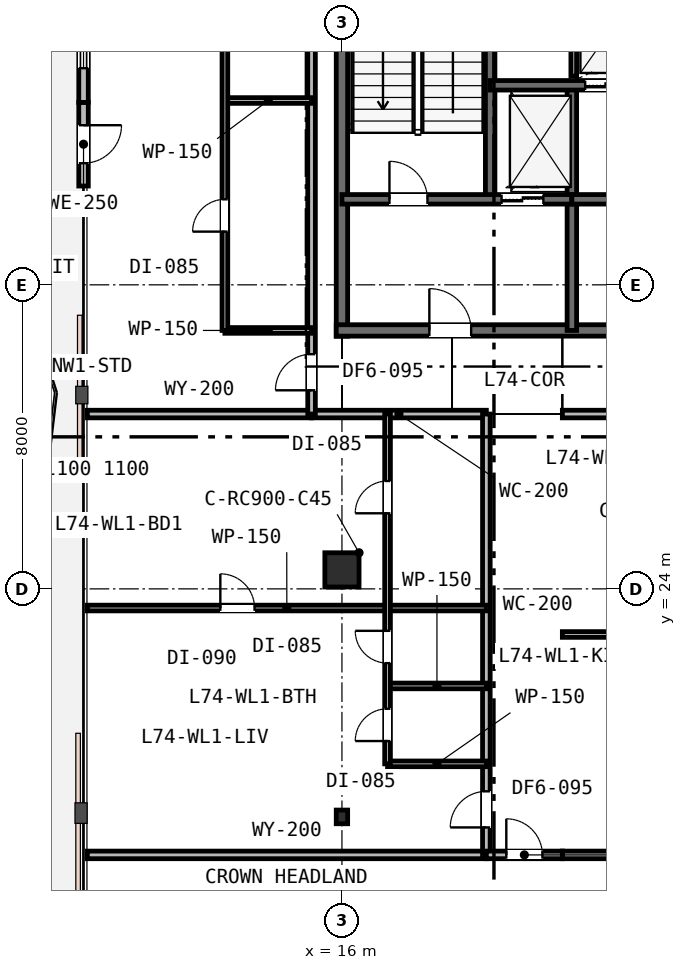
"""IFC4 building model, lengths in metres.
Left out: names, types, materials, properties, quantities, classifications, styles, units other than length and angle.
Written with IfcOpenShell. Run it as: python <this file> out.ifc"""

import sys

from ifc_helpers import new_model, si_unit, direction, frame, frame_2d, origin, origin_2d, place, context, subcontext, project, spatial, rectangle, i_section, extrude, element, fill, save


model = new_model("IFC4")
c1 = context("Model", 3, precision=1e-05, world=origin(), true_north=direction((0.0, 1.0)))
c2 = subcontext(c1, "Body", "Model", "MODEL_VIEW")
j1 = project(units=[si_unit("LENGTHUNIT", "METRE"), si_unit("PLANEANGLEUNIT", "RADIAN")], contexts=[c1])
p1 = place(None, origin())
s1 = spatial("IfcSite", under=j1, at=p1, CompositionType="ELEMENT")
p2 = place(p1, origin())
s2 = spatial("IfcBuilding", under=s1, at=p2, CompositionType="ELEMENT")
p3 = place(p2, frame((0.0, 0.0, 286.8)))
s3 = spatial("IfcBuildingStorey", under=s2, at=p3, CompositionType="ELEMENT", Elevation=286.8)
p4 = place(p3, frame((16.0, 30.65, 0.0), z_axis=(0.0, 0.0, 1.0), x_axis=(0.0, 1.0, 0.0)))
e1 = element("IfcWall", 1, at=p4, inside=s3, PredefinedType="SHEAR", context=c2, shape_type="SweptSolid", body=[
    extrude(rectangle(XDim=12.3, YDim=0.3, at=frame_2d((6.15, 0.0))), origin(), (0.0, 0.0, 1.0), 3.8),
])
p5 = place(p3, frame((15.85, 30.8, 0.0), z_axis=(0.0, 0.0, 1.0), x_axis=(1.0, 0.0, 0.0)))
e2 = element("IfcWall", 2, at=p5, inside=s3, PredefinedType="SHEAR", context=c2, shape_type="SweptSolid", body=[
    extrude(rectangle(XDim=11.2, YDim=0.3, at=frame_2d((5.6, 0.0))), origin(), (0.0, 0.0, 1.0), 3.8),
])
p6 = place(p5, frame((2.45, 0.0, 0.0)))
e3 = element("IfcOpeningElement", 3, at=p6, cuts=e2, PredefinedType="OPENING", context=c2, shape_type="SweptSolid", body=[
    extrude(rectangle(XDim=1.1, YDim=2.15, at=frame_2d((0.55, 1.075))), frame((0.0, 0.16, 0.0), z_axis=(0.0, -1.0, 0.0), x_axis=(1.0, 0.0, 0.0)), (0.0, 0.0, 1.0), 0.32),
])
p7 = place(p3, frame((19.9, 34.25, 0.0), z_axis=(0.0, 0.0, 1.0), x_axis=(0.0, 1.0, 0.0)))
e4 = element("IfcWall", 4, at=p7, inside=s3, PredefinedType="SHEAR", context=c2, shape_type="SweptSolid", body=[
    extrude(rectangle(XDim=8.65, YDim=0.25, at=frame_2d((4.325, 0.0))), origin(), (0.0, 0.0, 1.0), 3.8),
])
p8 = place(p3, frame((22.05, 30.8, 0.0), z_axis=(0.0, 0.0, 1.0), x_axis=(0.0, 1.0, 0.0)))
e5 = element("IfcWall", 5, at=p8, inside=s3, PredefinedType="SHEAR", context=c2, shape_type="SweptSolid", body=[
    extrude(rectangle(XDim=6.45, YDim=0.25, at=frame_2d((3.225, 0.0))), origin(), (0.0, 0.0, 1.0), 3.8),
])
p9 = place(p3, frame((16.0, 34.25, 0.0), z_axis=(0.0, 0.0, 1.0), x_axis=(1.0, 0.0, 0.0)))
e6 = element("IfcWall", 6, at=p9, inside=s3, PredefinedType="SHEAR", context=c2, shape_type="SweptSolid", body=[
    extrude(rectangle(XDim=6.05, YDim=0.25, at=frame_2d((3.025, 0.0))), origin(), (0.0, 0.0, 1.0), 3.8),
])
p10 = place(p9, frame((1.25, 0.0, 0.0)))
e7 = element("IfcOpeningElement", 7, at=p10, cuts=e6, PredefinedType="OPENING", context=c2, shape_type="SweptSolid", body=[
    extrude(rectangle(XDim=1.0, YDim=2.15, at=frame_2d((0.5, 1.075))), frame((0.0, 0.135, 0.0), z_axis=(0.0, -1.0, 0.0), x_axis=(1.0, 0.0, 0.0)), (0.0, 0.0, 1.0), 0.27),
])
p11 = place(p9, frame((4.2, 0.0, 0.0)))
e8 = element("IfcOpeningElement", 8, at=p11, cuts=e6, PredefinedType="OPENING", context=c2, shape_type="SweptSolid", body=[
    extrude(rectangle(XDim=1.1, YDim=2.15, at=frame_2d((0.55, 1.075))), frame((0.0, 0.135, 0.0), z_axis=(0.0, -1.0, 0.0), x_axis=(1.0, 0.0, 0.0)), (0.0, 0.0, 1.0), 0.27),
])
p12 = place(p3, frame((22.05, 34.25, 0.0), z_axis=(0.0, 0.0, 1.0), x_axis=(1.0, 0.0, 0.0)))
e9 = element("IfcWall", 9, at=p12, inside=s3, PredefinedType="SHEAR", context=c2, shape_type="SweptSolid", body=[
    extrude(rectangle(XDim=5.0, YDim=0.25, at=frame_2d((2.5, 0.0))), origin(), (0.0, 0.0, 1.0), 3.8),
])
p13 = place(p12, frame((1.95, 0.0, 0.0)))
e10 = element("IfcOpeningElement", 10, at=p13, cuts=e9, PredefinedType="OPENING", context=c2, shape_type="SweptSolid", body=[
    extrude(rectangle(XDim=1.0, YDim=2.15, at=frame_2d((0.5, 1.075))), frame((0.0, 0.135, 0.0), z_axis=(0.0, -1.0, 0.0), x_axis=(1.0, 0.0, 0.0)), (0.0, 0.0, 1.0), 0.27),
])
p14 = place(p3, frame((19.9, 37.25, 0.0), z_axis=(0.0, 0.0, 1.0), x_axis=(1.0, 0.0, 0.0)))
e11 = element("IfcWall", 11, at=p14, inside=s3, PredefinedType="SHEAR", context=c2, shape_type="SweptSolid", body=[
    extrude(rectangle(XDim=16.2, YDim=0.25, at=frame_2d((8.1, 0.0))), origin(), (0.0, 0.0, 1.0), 3.8),
])
p15 = place(p14, frame((12.55, 0.0, 0.0)))
e12 = element("IfcOpeningElement", 12, at=p15, cuts=e11, PredefinedType="OPENING", context=c2, shape_type="SweptSolid", body=[
    extrude(rectangle(XDim=0.9, YDim=2.15, at=frame_2d((0.45, 1.075))), frame((0.0, 0.135, 0.0), z_axis=(0.0, -1.0, 0.0), x_axis=(1.0, 0.0, 0.0)), (0.0, 0.0, 1.0), 0.27),
])
p16 = place(p14, frame((2.5, 0.0, 0.0)))
e13 = element("IfcOpeningElement", 13, at=p16, cuts=e11, PredefinedType="OPENING", context=c2, shape_type="SweptSolid", body=[
    extrude(rectangle(XDim=1.05, YDim=2.15, at=frame_2d((0.525, 1.075))), frame((0.0, 0.135, 0.0), z_axis=(0.0, -1.0, 0.0), x_axis=(1.0, 0.0, 0.0)), (0.0, 0.0, 1.0), 0.27),
])
p17 = place(p14, frame((4.4, 0.0, 0.0)))
e14 = element("IfcOpeningElement", 14, at=p17, cuts=e11, PredefinedType="OPENING", context=c2, shape_type="SweptSolid", body=[
    extrude(rectangle(XDim=1.05, YDim=2.15, at=frame_2d((0.525, 1.075))), frame((0.0, 0.135, 0.0), z_axis=(0.0, -1.0, 0.0), x_axis=(1.0, 0.0, 0.0)), (0.0, 0.0, 1.0), 0.27),
])
p18 = place(p14, frame((6.3, 0.0, 0.0)))
e15 = element("IfcOpeningElement", 15, at=p18, cuts=e11, PredefinedType="OPENING", context=c2, shape_type="SweptSolid", body=[
    extrude(rectangle(XDim=1.05, YDim=2.15, at=frame_2d((0.525, 1.075))), frame((0.0, 0.135, 0.0), z_axis=(0.0, -1.0, 0.0), x_axis=(1.0, 0.0, 0.0)), (0.0, 0.0, 1.0), 0.27),
])
p19 = place(p3, frame((16.0, 24.5, 0.0), z_axis=(0.0, 0.0, 1.0), x_axis=(1.0, 0.0, 0.0)))
e16 = element("IfcColumn", 16, at=p19, inside=s3, PredefinedType="COLUMN", context=c2, shape_type="SweptSolid", body=[
    extrude(rectangle(XDim=0.9, YDim=0.9, at=origin_2d()), origin(), (0.0, 0.0, 1.0), 3.8),
])
p20 = place(p3, frame((16.0, 18.0, 0.0), z_axis=(0.0, 0.0, 1.0), x_axis=(1.0, 0.0, 0.0)))
e17 = element("IfcColumn", 17, at=p20, inside=s3, PredefinedType="COLUMN", context=c2, shape_type="SweptSolid", body=[
    extrude(i_section(OverallWidth=0.3, OverallDepth=0.36, WebThickness=0.013, FlangeThickness=0.022, FilletRadius=0.027, at=origin_2d()), origin(), (0.0, 0.0, 1.0), 3.8),
])
p21 = place(p3, frame((9.2, 36.8, 0.0), z_axis=(0.0, 0.0, 1.0), x_axis=(0.0, -1.0, 0.0)))
e18 = element("IfcWall", 18, at=p21, inside=s3, PredefinedType="STANDARD", context=c2, shape_type="SweptSolid", body=[
    extrude(rectangle(XDim=2.2, YDim=0.25, at=frame_2d((1.1, 0.0))), origin(), (0.0, 0.0, 1.0), 3.47),
])
p22 = place(p21, frame((0.6, 0.0, 0.0)))
e19 = element("IfcOpeningElement", 19, at=p22, cuts=e18, PredefinedType="OPENING", context=c2, shape_type="SweptSolid", body=[
    extrude(rectangle(XDim=1.0, YDim=2.15, at=frame_2d((0.5, 1.075))), frame((0.0, 0.135, 0.0), z_axis=(0.0, -1.0, 0.0), x_axis=(1.0, 0.0, 0.0)), (0.0, 0.0, 1.0), 0.27),
])
p23 = place(p3, frame((9.2, 40.4, 0.0), z_axis=(0.0, 0.0, 1.0), x_axis=(0.0, -1.0, 0.0)))
e20 = element("IfcWall", 20, at=p23, inside=s3, PredefinedType="STANDARD", context=c2, shape_type="SweptSolid", body=[
    extrude(rectangle(XDim=3.6, YDim=0.25, at=frame_2d((1.8, 0.0))), origin(), (0.0, 0.0, 1.0), 3.47),
])
p24 = place(p23, frame((0.9, 0.0, 0.75)))
e21 = element("IfcOpeningElement", 21, at=p24, cuts=e20, PredefinedType="OPENING", context=c2, shape_type="SweptSolid", body=[
    extrude(rectangle(XDim=1.8, YDim=1.85, at=frame_2d((0.9, 0.925))), frame((0.0, 0.135, 0.0), z_axis=(0.0, -1.0, 0.0), x_axis=(1.0, 0.0, 0.0)), (0.0, 0.0, 1.0), 0.27),
])
p25 = place(p3, frame((22.1, 37.49, 0.0), z_axis=(0.0, 0.0, 1.0), x_axis=(0.0, 1.0, 0.0)))
e22 = element("IfcWall", 22, at=p25, inside=s3, PredefinedType="PLUMBINGWALL", context=c2, shape_type="SweptSolid", body=[
    extrude(rectangle(XDim=2.56, YDim=0.15, at=frame_2d((1.28, 0.0))), origin(), (0.0, 0.0, 1.0), 3.47),
])
p26 = place(p3, frame((9.3, 28.6, 0.0), z_axis=(0.0, 0.0, 1.0), x_axis=(1.0, 0.0, 0.0)))
e23 = element("IfcWall", 23, at=p26, inside=s3, PredefinedType="PARTITIONING", context=c2, shape_type="SweptSolid", body=[
    extrude(rectangle(XDim=5.9, YDim=0.2, at=frame_2d((2.95, 0.0))), origin(), (0.0, 0.0, 1.0), 3.47),
])
p27 = place(p3, frame((15.2, 28.6, 0.0), z_axis=(0.0, 0.0, 1.0), x_axis=(1.0, 0.0, 0.0)))
e24 = element("IfcWall", 24, at=p27, inside=s3, PredefinedType="PARTITIONING", context=c2, shape_type="SweptSolid", body=[
    extrude(rectangle(XDim=4.6, YDim=0.2, at=frame_2d((2.3, 0.0))), origin(), (0.0, 0.0, 1.0), 3.18),
])
p28 = place(p3, frame((21.8, 28.6, 0.0), z_axis=(0.0, 0.0, 1.0), x_axis=(1.0, 0.0, 0.0)))
e25 = element("IfcWall", 25, at=p28, inside=s3, PredefinedType="PARTITIONING", context=c2, shape_type="SweptSolid", body=[
    extrude(rectangle(XDim=24.1, YDim=0.2, at=frame_2d((12.05, 0.0))), origin(), (0.0, 0.0, 1.0), 3.18),
])
p29 = place(p28, frame((5.525, 0.0, 0.0)))
e26 = element("IfcOpeningElement", 26, at=p29, cuts=e25, PredefinedType="OPENING", context=c2, shape_type="SweptSolid", body=[
    extrude(rectangle(XDim=0.95, YDim=2.15, at=frame_2d((0.475, 1.075))), frame((0.0, 0.11, 0.0), z_axis=(0.0, -1.0, 0.0), x_axis=(1.0, 0.0, 0.0)), (0.0, 0.0, 1.0), 0.22),
])
p30 = place(p28, frame((13.025, 0.0, 0.0)))
e27 = element("IfcOpeningElement", 27, at=p30, cuts=e25, PredefinedType="OPENING", context=c2, shape_type="SweptSolid", body=[
    extrude(rectangle(XDim=0.95, YDim=2.15, at=frame_2d((0.475, 1.075))), frame((0.0, 0.11, 0.0), z_axis=(0.0, -1.0, 0.0), x_axis=(1.0, 0.0, 0.0)), (0.0, 0.0, 1.0), 0.22),
])
p31 = place(p28, frame((17.625, 0.0, 0.0)))
e28 = element("IfcOpeningElement", 28, at=p31, cuts=e25, PredefinedType="OPENING", context=c2, shape_type="SweptSolid", body=[
    extrude(rectangle(XDim=0.95, YDim=2.15, at=frame_2d((0.475, 1.075))), frame((0.0, 0.11, 0.0), z_axis=(0.0, -1.0, 0.0), x_axis=(1.0, 0.0, 0.0)), (0.0, 0.0, 1.0), 0.22),
])
p32 = place(p3, frame((15.2, 28.6, 0.0), z_axis=(0.0, 0.0, 1.0), x_axis=(0.0, 1.0, 0.0)))
e29 = element("IfcWall", 29, at=p32, inside=s3, PredefinedType="PARTITIONING", context=c2, shape_type="SweptSolid", body=[
    extrude(rectangle(XDim=14.3, YDim=0.2, at=frame_2d((7.15, 0.0))), origin(), (0.0, 0.0, 1.0), 3.47),
])
p33 = place(p32, frame((0.625, 0.0, 0.0)))
e30 = element("IfcOpeningElement", 30, at=p33, cuts=e29, PredefinedType="OPENING", context=c2, shape_type="SweptSolid", body=[
    extrude(rectangle(XDim=0.95, YDim=2.15, at=frame_2d((0.475, 1.075))), frame((0.0, 0.11, 0.0), z_axis=(0.0, -1.0, 0.0), x_axis=(1.0, 0.0, 0.0)), (0.0, 0.0, 1.0), 0.22),
])
for number, where, z_axis, x_axis in (
    (31, (12.92, 30.8, 0.0), (0.0, 0.0, 1.0), (1.0, 0.0, 0.0)),
    (32, (12.92, 36.85, 0.0), (0.0, 0.0, 1.0), (1.0, 0.0, 0.0)),
):
    element("IfcWall", number, at=place(p3, frame(where, z_axis=z_axis, x_axis=x_axis)), inside=s3, PredefinedType="PARTITIONING", context=c2, shape_type="SweptSolid", body=[
        extrude(rectangle(XDim=2.28, YDim=0.15, at=frame_2d((1.14, 0.0))), origin(), (0.0, 0.0, 1.0), 3.47),
    ])
p34 = place(p3, frame((12.92, 30.8, 0.0), z_axis=(0.0, 0.0, 1.0), x_axis=(0.0, 1.0, 0.0)))
e33 = element("IfcWall", 33, at=p34, inside=s3, PredefinedType="PARTITIONING", context=c2, shape_type="SweptSolid", body=[
    extrude(rectangle(XDim=12.1, YDim=0.15, at=frame_2d((6.05, 0.0))), origin(), (0.0, 0.0, 1.0), 3.47),
])
p35 = place(p34, frame((2.6, 0.0, 0.0)))
e34 = element("IfcOpeningElement", 34, at=p35, cuts=e33, PredefinedType="OPENING", context=c2, shape_type="SweptSolid", body=[
    extrude(rectangle(XDim=0.85, YDim=2.15, at=frame_2d((0.425, 1.075))), frame((0.0, 0.085, 0.0), z_axis=(0.0, -1.0, 0.0), x_axis=(1.0, 0.0, 0.0)), (0.0, 0.0, 1.0), 0.17),
])
p36 = place(p34, frame((8.65, 0.0, 0.0)))
e35 = element("IfcOpeningElement", 35, at=p36, cuts=e33, PredefinedType="OPENING", context=c2, shape_type="SweptSolid", body=[
    extrude(rectangle(XDim=0.85, YDim=2.15, at=frame_2d((0.425, 1.075))), frame((0.0, 0.085, 0.0), z_axis=(0.0, -1.0, 0.0), x_axis=(1.0, 0.0, 0.0)), (0.0, 0.0, 1.0), 0.17),
])
p37 = place(p3, frame((9.3, 17.0, 0.0), z_axis=(0.0, 0.0, 1.0), x_axis=(1.0, 0.0, 0.0)))
e36 = element("IfcWall", 36, at=p37, inside=s3, PredefinedType="PARTITIONING", context=c2, shape_type="SweptSolid", body=[
    extrude(rectangle(XDim=10.5, YDim=0.2, at=frame_2d((5.25, 0.0))), origin(), (0.0, 0.0, 1.0), 3.47),
])
p38 = place(p3, frame((21.8, 17.0, 0.0), z_axis=(0.0, 0.0, 1.0), x_axis=(1.0, 0.0, 0.0)))
e37 = element("IfcWall", 37, at=p38, inside=s3, PredefinedType="PARTITIONING", context=c2, shape_type="SweptSolid", body=[
    extrude(rectangle(XDim=2.1, YDim=0.2, at=frame_2d((1.05, 0.0))), origin(), (0.0, 0.0, 1.0), 3.47),
])
p39 = place(p3, frame((19.8, 17.0, 0.0), z_axis=(0.0, 0.0, 1.0), x_axis=(0.0, 1.0, 0.0)))
e38 = element("IfcWall", 38, at=p39, inside=s3, PredefinedType="PARTITIONING", context=c2, shape_type="SweptSolid", body=[
    extrude(rectangle(XDim=11.6, YDim=0.2, at=frame_2d((5.8, 0.0))), origin(), (0.0, 0.0, 1.0), 3.18),
])
p40 = place(p39, frame((0.723, 0.0, 0.0)))
e39 = element("IfcOpeningElement", 39, at=p40, cuts=e38, PredefinedType="OPENING", context=c2, shape_type="SweptSolid", body=[
    extrude(rectangle(XDim=0.95, YDim=2.15, at=frame_2d((0.475, 1.075))), frame((0.0, 0.11, 0.0), z_axis=(0.0, -1.0, 0.0), x_axis=(1.0, 0.0, 0.0)), (0.0, 0.0, 1.0), 0.22),
])
for number, where, z_axis, x_axis in (
    (40, (17.2, 19.396, 0.0), (0.0, 0.0, 1.0), (1.0, 0.0, 0.0)),
    (41, (17.2, 21.446, 0.0), (0.0, 0.0, 1.0), (1.0, 0.0, 0.0)),
):
    element("IfcWall", number, at=place(p3, frame(where, z_axis=z_axis, x_axis=x_axis)), inside=s3, PredefinedType="PARTITIONING", context=c2, shape_type="SweptSolid", body=[
        extrude(rectangle(XDim=2.6, YDim=0.15, at=frame_2d((1.3, 0.0))), origin(), (0.0, 0.0, 1.0), 3.47),
    ])
p41 = place(p3, frame((9.3, 23.496, 0.0), z_axis=(0.0, 0.0, 1.0), x_axis=(1.0, 0.0, 0.0)))
e42 = element("IfcWall", 42, at=p41, inside=s3, PredefinedType="PARTITIONING", context=c2, shape_type="SweptSolid", body=[
    extrude(rectangle(XDim=10.5, YDim=0.15, at=frame_2d((5.25, 0.0))), origin(), (0.0, 0.0, 1.0), 3.47),
])
p42 = place(p41, frame((3.5, 0.0, 0.0)))
e43 = element("IfcOpeningElement", 43, at=p42, cuts=e42, PredefinedType="OPENING", context=c2, shape_type="SweptSolid", body=[
    extrude(rectangle(XDim=0.9, YDim=2.15, at=frame_2d((0.45, 1.075))), frame((0.0, 0.085, 0.0), z_axis=(0.0, -1.0, 0.0), x_axis=(1.0, 0.0, 0.0)), (0.0, 0.0, 1.0), 0.17),
])
p43 = place(p3, frame((17.2, 19.396, 0.0), z_axis=(0.0, 0.0, 1.0), x_axis=(0.0, 1.0, 0.0)))
e44 = element("IfcWall", 44, at=p43, inside=s3, PredefinedType="PARTITIONING", context=c2, shape_type="SweptSolid", body=[
    extrude(rectangle(XDim=9.204, YDim=0.15, at=frame_2d((4.602, 0.0))), origin(), (0.0, 0.0, 1.0), 3.18),
])
p44 = place(p43, frame((0.6, 0.0, 0.0)))
e45 = element("IfcOpeningElement", 45, at=p44, cuts=e44, PredefinedType="OPENING", context=c2, shape_type="SweptSolid", body=[
    extrude(rectangle(XDim=0.85, YDim=2.15, at=frame_2d((0.425, 1.075))), frame((0.0, 0.085, 0.0), z_axis=(0.0, -1.0, 0.0), x_axis=(1.0, 0.0, 0.0)), (0.0, 0.0, 1.0), 0.17),
])
p45 = place(p43, frame((2.65, 0.0, 0.0)))
e46 = element("IfcOpeningElement", 46, at=p45, cuts=e44, PredefinedType="OPENING", context=c2, shape_type="SweptSolid", body=[
    extrude(rectangle(XDim=0.85, YDim=2.15, at=frame_2d((0.425, 1.075))), frame((0.0, 0.085, 0.0), z_axis=(0.0, -1.0, 0.0), x_axis=(1.0, 0.0, 0.0)), (0.0, 0.0, 1.0), 0.17),
])
p46 = place(p43, frame((6.593, 0.0, 0.0)))
e47 = element("IfcOpeningElement", 47, at=p46, cuts=e44, PredefinedType="OPENING", context=c2, shape_type="SweptSolid", body=[
    extrude(rectangle(XDim=0.85, YDim=2.15, at=frame_2d((0.425, 1.075))), frame((0.0, 0.085, 0.0), z_axis=(0.0, -1.0, 0.0), x_axis=(1.0, 0.0, 0.0)), (0.0, 0.0, 1.0), 0.17),
])
p47 = place(p3, frame((21.8, 22.8, 0.0), z_axis=(0.0, 0.0, 1.0), x_axis=(1.0, 0.0, 0.0)))
e48 = element("IfcWall", 48, at=p47, inside=s3, PredefinedType="PARTITIONING", context=c2, shape_type="SweptSolid", body=[
    extrude(rectangle(XDim=2.1, YDim=0.15, at=frame_2d((1.05, 0.0))), origin(), (0.0, 0.0, 1.0), 3.47),
])
p48 = place(p3, frame((19.8, 17.0, 0.0), z_axis=(0.0, 0.0, 1.0), x_axis=(1.0, 0.0, 0.0)))
e49 = element("IfcWall", 49, at=p48, inside=s3, PredefinedType="PARTITIONING", context=c2, shape_type="SweptSolid", body=[
    extrude(rectangle(XDim=2.0, YDim=0.2, at=frame_2d((1.0, 0.0))), origin(), (0.0, 0.0, 1.0), 3.47),
])
p49 = place(p48, frame((0.525, 0.0, 0.0)))
e50 = element("IfcOpeningElement", 50, at=p49, cuts=e49, PredefinedType="OPENING", context=c2, shape_type="SweptSolid", body=[
    extrude(rectangle(XDim=0.95, YDim=2.15, at=frame_2d((0.475, 1.075))), frame((0.0, 0.11, 0.0), z_axis=(0.0, -1.0, 0.0), x_axis=(1.0, 0.0, 0.0)), (0.0, 0.0, 1.0), 0.22),
])
p50 = place(p22, origin())
e51 = element("IfcDoor", 51, at=p50, inside=s3, OperationType="SINGLE_SWING_LEFT", PredefinedType="DOOR", context=c2, shape_type="SweptSolid", body=[
    extrude(rectangle(XDim=1.0, YDim=2.15, at=frame_2d((0.5, 1.075))), frame((0.0, 0.025, 0.0), z_axis=(0.0, -1.0, 0.0), x_axis=(1.0, 0.0, 0.0)), (0.0, 0.0, 1.0), 0.05),
])
fill(e19, e51)
p51 = place(p24, origin())
e52 = element("IfcWindow", 52, at=p51, inside=s3, PartitioningType="SINGLE_PANEL", PredefinedType="WINDOW", context=c2, shape_type="SweptSolid", body=[
    extrude(rectangle(XDim=1.8, YDim=1.85, at=frame_2d((0.9, 0.925))), frame((0.0, 0.03, 0.0), z_axis=(0.0, -1.0, 0.0), x_axis=(1.0, 0.0, 0.0)), (0.0, 0.0, 1.0), 0.06),
])
fill(e21, e52)
p52 = place(p10, origin())
e53 = element("IfcDoor", 53, at=p52, inside=s3, OperationType="SINGLE_SWING_LEFT", PredefinedType="DOOR", context=c2, shape_type="SweptSolid", body=[
    extrude(rectangle(XDim=1.0, YDim=2.15, at=frame_2d((0.5, 1.075))), frame((0.0, 0.025, 0.0), z_axis=(0.0, -1.0, 0.0), x_axis=(1.0, 0.0, 0.0)), (0.0, 0.0, 1.0), 0.05),
])
fill(e7, e53)
p53 = place(p6, origin())
e54 = element("IfcDoor", 54, at=p53, inside=s3, OperationType="SINGLE_SWING_LEFT", PredefinedType="DOOR", context=c2, shape_type="SweptSolid", body=[
    extrude(rectangle(XDim=1.1, YDim=2.15, at=frame_2d((0.55, 1.075))), frame((0.0, 0.025, 0.0), z_axis=(0.0, -1.0, 0.0), x_axis=(1.0, 0.0, 0.0)), (0.0, 0.0, 1.0), 0.05),
])
fill(e3, e54)
p54 = place(p33, origin())
e55 = element("IfcDoor", 55, at=p54, inside=s3, OperationType="SINGLE_SWING_LEFT", PredefinedType="DOOR", context=c2, shape_type="SweptSolid", body=[
    extrude(rectangle(XDim=0.95, YDim=2.15, at=frame_2d((0.475, 1.075))), frame((0.0, 0.025, 0.0), z_axis=(0.0, -1.0, 0.0), x_axis=(1.0, 0.0, 0.0)), (0.0, 0.0, 1.0), 0.05),
])
fill(e30, e55)
p55 = place(p35, origin())
e56 = element("IfcDoor", 56, at=p55, inside=s3, OperationType="SINGLE_SWING_LEFT", PredefinedType="DOOR", context=c2, shape_type="SweptSolid", body=[
    extrude(rectangle(XDim=0.85, YDim=2.15, at=frame_2d((0.425, 1.075))), frame((0.0, 0.025, 0.0), z_axis=(0.0, -1.0, 0.0), x_axis=(1.0, 0.0, 0.0)), (0.0, 0.0, 1.0), 0.05),
])
fill(e34, e56)
p56 = place(p40, origin())
e57 = element("IfcDoor", 57, at=p56, inside=s3, OperationType="SINGLE_SWING_LEFT", PredefinedType="DOOR", context=c2, shape_type="SweptSolid", body=[
    extrude(rectangle(XDim=0.95, YDim=2.15, at=frame_2d((0.475, 1.075))), frame((0.0, 0.025, 0.0), z_axis=(0.0, -1.0, 0.0), x_axis=(1.0, 0.0, 0.0)), (0.0, 0.0, 1.0), 0.05),
])
fill(e39, e57)
p57 = place(p44, origin())
e58 = element("IfcDoor", 58, at=p57, inside=s3, OperationType="SINGLE_SWING_LEFT", PredefinedType="DOOR", context=c2, shape_type="SweptSolid", body=[
    extrude(rectangle(XDim=0.85, YDim=2.15, at=frame_2d((0.425, 1.075))), frame((0.0, 0.025, 0.0), z_axis=(0.0, -1.0, 0.0), x_axis=(1.0, 0.0, 0.0)), (0.0, 0.0, 1.0), 0.05),
])
fill(e45, e58)
p58 = place(p45, origin())
e59 = element("IfcDoor", 59, at=p58, inside=s3, OperationType="SINGLE_SWING_RIGHT", PredefinedType="DOOR", context=c2, shape_type="SweptSolid", body=[
    extrude(rectangle(XDim=0.85, YDim=2.15, at=frame_2d((0.425, 1.075))), frame((0.0, 0.025, 0.0), z_axis=(0.0, -1.0, 0.0), x_axis=(1.0, 0.0, 0.0)), (0.0, 0.0, 1.0), 0.05),
])
fill(e46, e59)
p59 = place(p46, origin())
e60 = element("IfcDoor", 60, at=p59, inside=s3, OperationType="SINGLE_SWING_LEFT", PredefinedType="DOOR", context=c2, shape_type="SweptSolid", body=[
    extrude(rectangle(XDim=0.85, YDim=2.15, at=frame_2d((0.425, 1.075))), frame((0.0, 0.025, 0.0), z_axis=(0.0, -1.0, 0.0), x_axis=(1.0, 0.0, 0.0)), (0.0, 0.0, 1.0), 0.05),
])
fill(e47, e60)
p60 = place(p42, origin())
e61 = element("IfcDoor", 61, at=p60, inside=s3, OperationType="SINGLE_SWING_LEFT", PredefinedType="DOOR", context=c2, shape_type="SweptSolid", body=[
    extrude(rectangle(XDim=0.9, YDim=2.15, at=frame_2d((0.45, 1.075))), frame((0.0, 0.025, 0.0), z_axis=(0.0, -1.0, 0.0), x_axis=(1.0, 0.0, 0.0)), (0.0, 0.0, 1.0), 0.05),
])
fill(e43, e61)
p61 = place(p49, origin())
e62 = element("IfcDoor", 62, at=p61, inside=s3, OperationType="SINGLE_SWING_LEFT", PredefinedType="DOOR", context=c2, shape_type="SweptSolid", body=[
    extrude(rectangle(XDim=0.95, YDim=2.15, at=frame_2d((0.475, 1.075))), frame((0.0, 0.025, 0.0), z_axis=(0.0, -1.0, 0.0), x_axis=(1.0, 0.0, 0.0)), (0.0, 0.0, 1.0), 0.05),
])
fill(e50, e62)
p62 = place(p11, origin())
e63 = element("IfcDoor", 63, at=p62, inside=s3, OperationType="DOUBLE_DOOR_SLIDING", PredefinedType="DOOR", context=c2, shape_type="SweptSolid", body=[
    extrude(rectangle(XDim=1.1, YDim=2.15, at=frame_2d((0.55, 1.075))), frame((0.0, 0.025, 0.0), z_axis=(0.0, -1.0, 0.0), x_axis=(1.0, 0.0, 0.0)), (0.0, 0.0, 1.0), 0.05),
])
fill(e8, e63)
p63 = place(p16, origin())
e64 = element("IfcDoor", 64, at=p63, inside=s3, OperationType="DOUBLE_DOOR_SLIDING", PredefinedType="DOOR", context=c2, shape_type="SweptSolid", body=[
    extrude(rectangle(XDim=1.05, YDim=2.15, at=frame_2d((0.525, 1.075))), frame((0.0, 0.025, 0.0), z_axis=(0.0, -1.0, 0.0), x_axis=(1.0, 0.0, 0.0)), (0.0, 0.0, 1.0), 0.05),
])
fill(e13, e64)
save(model, sys.argv[1])
